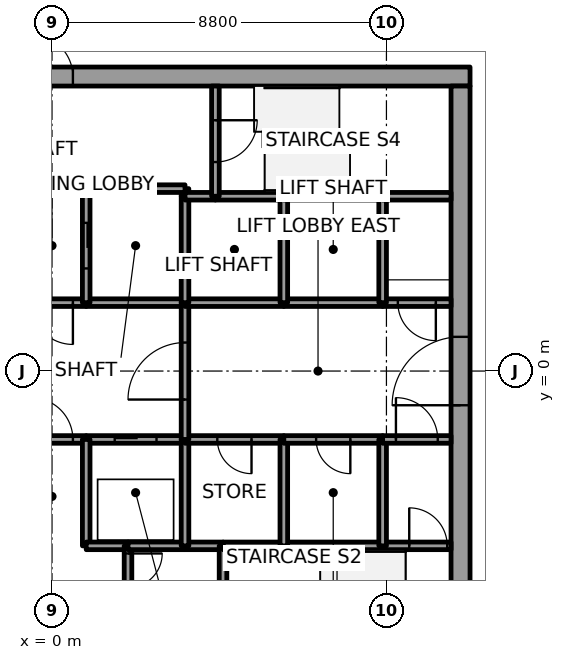
"""IFC4 building model, lengths in metres.
Left out: names, types, materials, properties, quantities, classifications, styles, units other than length and angle.
Written with IfcOpenShell. Run it as: python <this file> out.ifc"""

import sys

from ifc_helpers import new_model, si_unit, direction, frame, frame_2d, origin, place, context, subcontext, project, spatial, rectangle, extrude, element, fill, save


model = new_model("IFC4")
c1 = context("Model", 3, precision=1e-05, world=origin(), true_north=direction((0.0, 1.0)))
c2 = subcontext(c1, "Body", "Model", "MODEL_VIEW")
j1 = project(units=[si_unit("LENGTHUNIT", "METRE"), si_unit("PLANEANGLEUNIT", "RADIAN")], contexts=[c1])
p1 = place(None, origin())
s1 = spatial("IfcSite", under=j1, at=p1, CompositionType="ELEMENT")
p2 = place(p1, origin())
s2 = spatial("IfcBuilding", under=s1, at=p2, CompositionType="ELEMENT")
p3 = place(p2, frame((0.0, 0.0, 28.8)))
s3 = spatial("IfcBuildingStorey", under=s2, at=p3, CompositionType="ELEMENT", Elevation=28.8)
p4 = place(p3, frame((-11.0, 7.75, 0.0), z_axis=(0.0, 0.0, 1.0), x_axis=(1.0, 0.0, 0.0)))
e1 = element("IfcWall", 1, at=p4, inside=s3, PredefinedType="SHEAR", context=c2, shape_type="SweptSolid", body=[
    extrude(rectangle(XDim=22.0, YDim=0.5, at=frame_2d((11.0, 0.0))), origin(), (0.0, 0.0, 1.0), 5.4),
])
p5 = place(p4, frame((10.45, 0.0, 0.0)))
e2 = element("IfcOpeningElement", 2, at=p5, cuts=e1, PredefinedType="OPENING", context=c2, shape_type="SweptSolid", body=[
    extrude(rectangle(XDim=1.1, YDim=2.1, at=frame_2d((0.55, 1.05))), frame((0.0, 0.25, 0.0), z_axis=(0.0, -1.0, 0.0), x_axis=(1.0, 0.0, 0.0)), (0.0, 0.0, 1.0), 0.5),
])
p6 = place(p3, frame((10.75, -7.5, 0.0), z_axis=(0.0, 0.0, 1.0), x_axis=(0.0, 1.0, 0.0)))
e3 = element("IfcWall", 3, at=p6, inside=s3, PredefinedType="SHEAR", context=c2, shape_type="SweptSolid", body=[
    extrude(rectangle(XDim=15.0, YDim=0.5, at=frame_2d((7.5, 0.0))), origin(), (0.0, 0.0, 1.0), 5.4),
])
p7 = place(p6, frame((6.6, 0.0, 0.0)))
e4 = element("IfcOpeningElement", 4, at=p7, cuts=e3, PredefinedType="OPENING", context=c2, shape_type="SweptSolid", body=[
    extrude(rectangle(XDim=1.8, YDim=2.1, at=frame_2d((0.9, 1.05))), frame((0.0, 0.25, 0.0), z_axis=(0.0, -1.0, 0.0), x_axis=(1.0, 0.0, 0.0)), (0.0, 0.0, 1.0), 0.5),
])
p8 = place(p3, frame((-0.9, -1.8, 0.0), z_axis=(0.0, 0.0, 1.0), x_axis=(1.0, 0.0, 0.0)))
e5 = element("IfcWall", 5, at=p8, inside=s3, PredefinedType="SOLIDWALL", context=c2, shape_type="SweptSolid", body=[
    extrude(rectangle(XDim=1.8, YDim=0.2, at=frame_2d((0.9, 0.0))), origin(), (0.0, 0.0, 1.0), 5.0),
])
p9 = place(p8, frame((0.35, 0.0, 0.0)))
e6 = element("IfcOpeningElement", 6, at=p9, cuts=e5, PredefinedType="OPENING", context=c2, shape_type="SweptSolid", body=[
    extrude(rectangle(XDim=1.1, YDim=2.4, at=frame_2d((0.55, 1.2))), frame((0.0, 0.1, 0.0), z_axis=(0.0, -1.0, 0.0), x_axis=(1.0, 0.0, 0.0)), (0.0, 0.0, 1.0), 0.2),
])
p10 = place(p3, frame((0.9, 1.8, 0.0), z_axis=(0.0, 0.0, 1.0), x_axis=(-1.0, 0.0, 0.0)))
e7 = element("IfcWall", 7, at=p10, inside=s3, PredefinedType="SOLIDWALL", context=c2, shape_type="SweptSolid", body=[
    extrude(rectangle(XDim=1.8, YDim=0.2, at=frame_2d((0.9, 0.0))), origin(), (0.0, 0.0, 1.0), 5.0),
])
p11 = place(p10, frame((0.35, 0.0, 0.0)))
e8 = element("IfcOpeningElement", 8, at=p11, cuts=e7, PredefinedType="OPENING", context=c2, shape_type="SweptSolid", body=[
    extrude(rectangle(XDim=1.1, YDim=2.4, at=frame_2d((0.55, 1.2))), frame((0.0, 0.1, 0.0), z_axis=(0.0, -1.0, 0.0), x_axis=(1.0, 0.0, 0.0)), (0.0, 0.0, 1.0), 0.2),
])
p12 = place(p3, frame((0.9, -1.8, 0.0), z_axis=(0.0, 0.0, 1.0), x_axis=(1.0, 0.0, 0.0)))
e9 = element("IfcWall", 9, at=p12, inside=s3, PredefinedType="SOLIDWALL", context=c2, shape_type="SweptSolid", body=[
    extrude(rectangle(XDim=2.6, YDim=0.2, at=frame_2d((1.3, 0.0))), origin(), (0.0, 0.0, 1.0), 5.0),
])
p13 = place(p12, frame((0.75, 0.0, 0.0)))
e10 = element("IfcOpeningElement", 10, at=p13, cuts=e9, PredefinedType="OPENING", context=c2, shape_type="SweptSolid", body=[
    extrude(rectangle(XDim=1.1, YDim=2.1, at=frame_2d((0.55, 1.05))), frame((0.0, 0.1, 0.0), z_axis=(0.0, -1.0, 0.0), x_axis=(1.0, 0.0, 0.0)), (0.0, 0.0, 1.0), 0.2),
])
p14 = place(p3, frame((0.9, -1.8, 0.0), z_axis=(0.0, 0.0, 1.0), x_axis=(0.0, -1.0, 0.0)))
e11 = element("IfcWall", 11, at=p14, inside=s3, PredefinedType="SOLIDWALL", context=c2, shape_type="SweptSolid", body=[
    extrude(rectangle(XDim=2.8, YDim=0.2, at=frame_2d((1.4, 0.0))), origin(), (0.0, 0.0, 1.0), 5.0),
])
p15 = place(p3, frame((0.9, -4.6, 0.0), z_axis=(0.0, 0.0, 1.0), x_axis=(1.0, 0.0, 0.0)))
e12 = element("IfcWall", 12, at=p15, inside=s3, PredefinedType="SOLIDWALL", context=c2, shape_type="SweptSolid", body=[
    extrude(rectangle(XDim=1.1, YDim=0.2, at=frame_2d((0.55, 0.0))), origin(), (0.0, 0.0, 1.0), 5.0),
])
p16 = place(p3, frame((3.5, 1.8, 0.0), z_axis=(0.0, 0.0, 1.0), x_axis=(-1.0, 0.0, 0.0)))
e13 = element("IfcWall", 13, at=p16, inside=s3, PredefinedType="SOLIDWALL", context=c2, shape_type="SweptSolid", body=[
    extrude(rectangle(XDim=2.6, YDim=0.2, at=frame_2d((1.3, 0.0))), origin(), (0.0, 0.0, 1.0), 5.0),
])
p17 = place(p3, frame((3.5, 4.6, 0.0), z_axis=(0.0, 0.0, 1.0), x_axis=(0.0, 1.0, 0.0)))
e14 = element("IfcWall", 14, at=p17, inside=s3, PredefinedType="SOLIDWALL", context=c2, shape_type="SweptSolid", body=[
    extrude(rectangle(XDim=0.2, YDim=0.2, at=frame_2d((0.1, 0.0))), origin(), (0.0, 0.0, 1.0), 5.0),
])
p18 = place(p3, frame((3.5, 4.8, 0.0), z_axis=(0.0, 0.0, 1.0), x_axis=(-1.0, 0.0, 0.0)))
e15 = element("IfcWall", 15, at=p18, inside=s3, PredefinedType="SOLIDWALL", context=c2, shape_type="SweptSolid", body=[
    extrude(rectangle(XDim=2.6, YDim=0.2, at=frame_2d((1.3, 0.0))), origin(), (0.0, 0.0, 1.0), 5.0),
])
p19 = place(p3, frame((0.9, 4.8, 0.0), z_axis=(0.0, 0.0, 1.0), x_axis=(0.0, -1.0, 0.0)))
e16 = element("IfcWall", 16, at=p19, inside=s3, PredefinedType="SOLIDWALL", context=c2, shape_type="SweptSolid", body=[
    extrude(rectangle(XDim=3.0, YDim=0.2, at=frame_2d((1.5, 0.0))), origin(), (0.0, 0.0, 1.0), 5.0),
])
p20 = place(p19, frame((0.9, 0.0, 0.0)))
e17 = element("IfcOpeningElement", 17, at=p20, cuts=e16, PredefinedType="OPENING", context=c2, shape_type="SweptSolid", body=[
    extrude(rectangle(XDim=1.2, YDim=2.1, at=frame_2d((0.6, 1.05))), frame((0.0, 0.1, 0.0), z_axis=(0.0, -1.0, 0.0), x_axis=(1.0, 0.0, 0.0)), (0.0, 0.0, 1.0), 0.2),
])
p21 = place(p3, frame((2.0, -4.6, 0.0), z_axis=(0.0, 0.0, 1.0), x_axis=(0.0, -1.0, 0.0)))
e18 = element("IfcWall", 18, at=p21, inside=s3, PredefinedType="SOLIDWALL", context=c2, shape_type="SweptSolid", body=[
    extrude(rectangle(XDim=1.3, YDim=0.2, at=frame_2d((0.65, 0.0))), origin(), (0.0, 0.0, 1.0), 5.0),
])
p22 = place(p21, frame((0.2, 0.0, 0.0)))
e19 = element("IfcOpeningElement", 19, at=p22, cuts=e18, PredefinedType="OPENING", context=c2, shape_type="SweptSolid", body=[
    extrude(rectangle(XDim=0.9, YDim=2.4, at=frame_2d((0.45, 1.2))), frame((0.0, 0.1, 0.0), z_axis=(0.0, -1.0, 0.0), x_axis=(1.0, 0.0, 0.0)), (0.0, 0.0, 1.0), 0.2),
])
p23 = place(p3, frame((3.5, -4.6, 0.0), z_axis=(0.0, 0.0, 1.0), x_axis=(-1.0, 0.0, 0.0)))
e20 = element("IfcWall", 20, at=p23, inside=s3, PredefinedType="SOLIDWALL", context=c2, shape_type="SweptSolid", body=[
    extrude(rectangle(XDim=1.5, YDim=0.2, at=frame_2d((0.75, 0.0))), origin(), (0.0, 0.0, 1.0), 5.0),
])
p24 = place(p3, frame((3.5, -4.6, 0.0), z_axis=(0.0, 0.0, 1.0), x_axis=(1.0, 0.0, 0.0)))
e21 = element("IfcWall", 21, at=p24, inside=s3, PredefinedType="SOLIDWALL", context=c2, shape_type="SweptSolid", body=[
    extrude(rectangle(XDim=1.0, YDim=0.2, at=frame_2d((0.5, 0.0))), origin(), (0.0, 0.0, 1.0), 5.0),
])
p25 = place(p3, frame((3.5, -1.8, 0.0), z_axis=(0.0, 0.0, 1.0), x_axis=(0.0, -1.0, 0.0)))
e22 = element("IfcWall", 22, at=p25, inside=s3, PredefinedType="SOLIDWALL", context=c2, shape_type="SweptSolid", body=[
    extrude(rectangle(XDim=2.8, YDim=0.2, at=frame_2d((1.4, 0.0))), origin(), (0.0, 0.0, 1.0), 5.0),
])
p26 = place(p3, frame((6.1, -1.8, 0.0), z_axis=(0.0, 0.0, 1.0), x_axis=(-1.0, 0.0, 0.0)))
e23 = element("IfcWall", 23, at=p26, inside=s3, PredefinedType="SOLIDWALL", context=c2, shape_type="SweptSolid", body=[
    extrude(rectangle(XDim=2.6, YDim=0.2, at=frame_2d((1.3, 0.0))), origin(), (0.0, 0.0, 1.0), 5.0),
])
p27 = place(p26, frame((0.85, 0.0, 0.0)))
e24 = element("IfcOpeningElement", 24, at=p27, cuts=e23, PredefinedType="OPENING", context=c2, shape_type="SweptSolid", body=[
    extrude(rectangle(XDim=0.9, YDim=2.4, at=frame_2d((0.45, 1.2))), frame((0.0, 0.1, 0.0), z_axis=(0.0, -1.0, 0.0), x_axis=(1.0, 0.0, 0.0)), (0.0, 0.0, 1.0), 0.2),
])
p28 = place(p3, frame((3.5, -1.8, 0.0), z_axis=(0.0, 0.0, 1.0), x_axis=(0.0, 1.0, 0.0)))
e25 = element("IfcWall", 25, at=p28, inside=s3, PredefinedType="SOLIDWALL", context=c2, shape_type="SweptSolid", body=[
    extrude(rectangle(XDim=3.6, YDim=0.2, at=frame_2d((1.8, 0.0))), origin(), (0.0, 0.0, 1.0), 5.0),
])
p29 = place(p28, frame((1.05, 0.0, 0.0)))
e26 = element("IfcOpeningElement", 26, at=p29, cuts=e25, PredefinedType="OPENING", context=c2, shape_type="SweptSolid", body=[
    extrude(rectangle(XDim=1.5, YDim=2.4, at=frame_2d((0.75, 1.2))), frame((0.0, 0.1, 0.0), z_axis=(0.0, -1.0, 0.0), x_axis=(1.0, 0.0, 0.0)), (0.0, 0.0, 1.0), 0.2),
])
p30 = place(p3, frame((6.1, 1.8, 0.0), z_axis=(0.0, 0.0, 1.0), x_axis=(-1.0, 0.0, 0.0)))
e27 = element("IfcWall", 27, at=p30, inside=s3, PredefinedType="SOLIDWALL", context=c2, shape_type="SweptSolid", body=[
    extrude(rectangle(XDim=2.6, YDim=0.2, at=frame_2d((1.3, 0.0))), origin(), (0.0, 0.0, 1.0), 5.0),
])
p31 = place(p3, frame((3.5, 1.8, 0.0), z_axis=(0.0, 0.0, 1.0), x_axis=(0.0, 1.0, 0.0)))
e28 = element("IfcWall", 28, at=p31, inside=s3, PredefinedType="SOLIDWALL", context=c2, shape_type="SweptSolid", body=[
    extrude(rectangle(XDim=2.8, YDim=0.2, at=frame_2d((1.4, 0.0))), origin(), (0.0, 0.0, 1.0), 5.0),
])
p32 = place(p3, frame((4.3, 4.6, 0.0), z_axis=(0.0, 0.0, 1.0), x_axis=(-1.0, 0.0, 0.0)))
e29 = element("IfcWall", 29, at=p32, inside=s3, PredefinedType="SOLIDWALL", context=c2, shape_type="SweptSolid", body=[
    extrude(rectangle(XDim=0.8, YDim=0.2, at=frame_2d((0.4, 0.0))), origin(), (0.0, 0.0, 1.0), 5.0),
])
p33 = place(p3, frame((6.1, 4.6, 0.0), z_axis=(0.0, 0.0, 1.0), x_axis=(-1.0, 0.0, 0.0)))
e30 = element("IfcWall", 30, at=p33, inside=s3, PredefinedType="SOLIDWALL", context=c2, shape_type="SweptSolid", body=[
    extrude(rectangle(XDim=1.8, YDim=0.2, at=frame_2d((0.9, 0.0))), origin(), (0.0, 0.0, 1.0), 5.0),
])
p34 = place(p3, frame((4.3, 7.5, 0.0), z_axis=(0.0, 0.0, 1.0), x_axis=(0.0, -1.0, 0.0)))
e31 = element("IfcWall", 31, at=p34, inside=s3, PredefinedType="SOLIDWALL", context=c2, shape_type="SweptSolid", body=[
    extrude(rectangle(XDim=2.9, YDim=0.2, at=frame_2d((1.45, 0.0))), origin(), (0.0, 0.0, 1.0), 5.0),
])
p35 = place(p34, frame((0.9, 0.0, 0.0)))
e32 = element("IfcOpeningElement", 32, at=p35, cuts=e31, PredefinedType="OPENING", context=c2, shape_type="SweptSolid", body=[
    extrude(rectangle(XDim=1.1, YDim=2.4, at=frame_2d((0.55, 1.2))), frame((0.0, 0.1, 0.0), z_axis=(0.0, -1.0, 0.0), x_axis=(1.0, 0.0, 0.0)), (0.0, 0.0, 1.0), 0.2),
])
p36 = place(p3, frame((4.5, -5.9, 0.0), z_axis=(0.0, 0.0, 1.0), x_axis=(0.0, 1.0, 0.0)))
e33 = element("IfcWall", 33, at=p36, inside=s3, PredefinedType="SOLIDWALL", context=c2, shape_type="SweptSolid", body=[
    extrude(rectangle(XDim=1.3, YDim=0.2, at=frame_2d((0.65, 0.0))), origin(), (0.0, 0.0, 1.0), 5.0),
])
p37 = place(p3, frame((4.5, -4.6, 0.0), z_axis=(0.0, 0.0, 1.0), x_axis=(1.0, 0.0, 0.0)))
e34 = element("IfcWall", 34, at=p37, inside=s3, PredefinedType="SOLIDWALL", context=c2, shape_type="SweptSolid", body=[
    extrude(rectangle(XDim=1.6, YDim=0.2, at=frame_2d((0.8, 0.0))), origin(), (0.0, 0.0, 1.0), 5.0),
])
p38 = place(p3, frame((6.1, -4.6, 0.0), z_axis=(0.0, 0.0, 1.0), x_axis=(1.0, 0.0, 0.0)))
e35 = element("IfcWall", 35, at=p38, inside=s3, PredefinedType="SOLIDWALL", context=c2, shape_type="SweptSolid", body=[
    extrude(rectangle(XDim=2.6, YDim=0.2, at=frame_2d((1.3, 0.0))), origin(), (0.0, 0.0, 1.0), 5.0),
])
p39 = place(p3, frame((6.1, -4.6, 0.0), z_axis=(0.0, 0.0, 1.0), x_axis=(0.0, 1.0, 0.0)))
e36 = element("IfcWall", 36, at=p39, inside=s3, PredefinedType="SOLIDWALL", context=c2, shape_type="SweptSolid", body=[
    extrude(rectangle(XDim=2.8, YDim=0.2, at=frame_2d((1.4, 0.0))), origin(), (0.0, 0.0, 1.0), 5.0),
])
p40 = place(p3, frame((8.7, -1.8, 0.0), z_axis=(0.0, 0.0, 1.0), x_axis=(-1.0, 0.0, 0.0)))
e37 = element("IfcWall", 37, at=p40, inside=s3, PredefinedType="SOLIDWALL", context=c2, shape_type="SweptSolid", body=[
    extrude(rectangle(XDim=2.6, YDim=0.2, at=frame_2d((1.3, 0.0))), origin(), (0.0, 0.0, 1.0), 5.0),
])
p41 = place(p40, frame((0.85, 0.0, 0.0)))
e38 = element("IfcOpeningElement", 38, at=p41, cuts=e37, PredefinedType="OPENING", context=c2, shape_type="SweptSolid", body=[
    extrude(rectangle(XDim=0.9, YDim=2.4, at=frame_2d((0.45, 1.2))), frame((0.0, 0.1, 0.0), z_axis=(0.0, -1.0, 0.0), x_axis=(1.0, 0.0, 0.0)), (0.0, 0.0, 1.0), 0.2),
])
p42 = place(p3, frame((8.7, 1.8, 0.0), z_axis=(0.0, 0.0, 1.0), x_axis=(-1.0, 0.0, 0.0)))
e39 = element("IfcWall", 39, at=p42, inside=s3, PredefinedType="SOLIDWALL", context=c2, shape_type="SweptSolid", body=[
    extrude(rectangle(XDim=2.6, YDim=0.2, at=frame_2d((1.3, 0.0))), origin(), (0.0, 0.0, 1.0), 5.0),
])
p43 = place(p3, frame((6.1, 1.8, 0.0), z_axis=(0.0, 0.0, 1.0), x_axis=(0.0, 1.0, 0.0)))
e40 = element("IfcWall", 40, at=p43, inside=s3, PredefinedType="SOLIDWALL", context=c2, shape_type="SweptSolid", body=[
    extrude(rectangle(XDim=2.8, YDim=0.2, at=frame_2d((1.4, 0.0))), origin(), (0.0, 0.0, 1.0), 5.0),
])
p44 = place(p3, frame((8.7, 4.6, 0.0), z_axis=(0.0, 0.0, 1.0), x_axis=(-1.0, 0.0, 0.0)))
e41 = element("IfcWall", 41, at=p44, inside=s3, PredefinedType="SOLIDWALL", context=c2, shape_type="SweptSolid", body=[
    extrude(rectangle(XDim=2.6, YDim=0.2, at=frame_2d((1.3, 0.0))), origin(), (0.0, 0.0, 1.0), 5.0),
])
p45 = place(p3, frame((8.7, -4.6, 0.0), z_axis=(0.0, 0.0, 1.0), x_axis=(1.0, 0.0, 0.0)))
e42 = element("IfcWall", 42, at=p45, inside=s3, PredefinedType="SOLIDWALL", context=c2, shape_type="SweptSolid", body=[
    extrude(rectangle(XDim=1.8, YDim=0.2, at=frame_2d((0.9, 0.0))), origin(), (0.0, 0.0, 1.0), 5.0),
])
p46 = place(p45, frame((0.7, 0.0, 0.0)))
e43 = element("IfcOpeningElement", 43, at=p46, cuts=e42, PredefinedType="OPENING", context=c2, shape_type="SweptSolid", body=[
    extrude(rectangle(XDim=1.0, YDim=2.1, at=frame_2d((0.5, 1.05))), frame((0.0, 0.1, 0.0), z_axis=(0.0, -1.0, 0.0), x_axis=(1.0, 0.0, 0.0)), (0.0, 0.0, 1.0), 0.2),
])
p47 = place(p3, frame((8.7, -4.6, 0.0), z_axis=(0.0, 0.0, 1.0), x_axis=(0.0, 1.0, 0.0)))
e44 = element("IfcWall", 44, at=p47, inside=s3, PredefinedType="SOLIDWALL", context=c2, shape_type="SweptSolid", body=[
    extrude(rectangle(XDim=2.8, YDim=0.2, at=frame_2d((1.4, 0.0))), origin(), (0.0, 0.0, 1.0), 5.0),
])
p48 = place(p3, frame((8.7, -1.8, 0.0), z_axis=(0.0, 0.0, 1.0), x_axis=(1.0, 0.0, 0.0)))
e45 = element("IfcWall", 45, at=p48, inside=s3, PredefinedType="SOLIDWALL", context=c2, shape_type="SweptSolid", body=[
    extrude(rectangle(XDim=1.8, YDim=0.2, at=frame_2d((0.9, 0.0))), origin(), (0.0, 0.0, 1.0), 5.0),
])
p49 = place(p48, frame((0.35, 0.0, 0.0)))
e46 = element("IfcOpeningElement", 46, at=p49, cuts=e45, PredefinedType="OPENING", context=c2, shape_type="SweptSolid", body=[
    extrude(rectangle(XDim=1.1, YDim=2.4, at=frame_2d((0.55, 1.2))), frame((0.0, 0.1, 0.0), z_axis=(0.0, -1.0, 0.0), x_axis=(1.0, 0.0, 0.0)), (0.0, 0.0, 1.0), 0.2),
])
p50 = place(p3, frame((10.5, 1.8, 0.0), z_axis=(0.0, 0.0, 1.0), x_axis=(-1.0, 0.0, 0.0)))
e47 = element("IfcWall", 47, at=p50, inside=s3, PredefinedType="SOLIDWALL", context=c2, shape_type="SweptSolid", body=[
    extrude(rectangle(XDim=1.8, YDim=0.2, at=frame_2d((0.9, 0.0))), origin(), (0.0, 0.0, 1.0), 5.0),
])
p51 = place(p50, frame((0.4, 0.0, 0.0)))
e48 = element("IfcOpeningElement", 48, at=p51, cuts=e47, PredefinedType="OPENING", context=c2, shape_type="SweptSolid", body=[
    extrude(rectangle(XDim=1.0, YDim=2.4, at=frame_2d((0.5, 1.2))), frame((0.0, 0.1, 0.0), z_axis=(0.0, -1.0, 0.0), x_axis=(1.0, 0.0, 0.0)), (0.0, 0.0, 1.0), 0.2),
])
p52 = place(p3, frame((8.7, 4.6, 0.0), z_axis=(0.0, 0.0, 1.0), x_axis=(0.0, -1.0, 0.0)))
e49 = element("IfcWall", 49, at=p52, inside=s3, PredefinedType="SOLIDWALL", context=c2, shape_type="SweptSolid", body=[
    extrude(rectangle(XDim=2.8, YDim=0.2, at=frame_2d((1.4, 0.0))), origin(), (0.0, 0.0, 1.0), 5.0),
])
p53 = place(p3, frame((10.5, 4.6, 0.0), z_axis=(0.0, 0.0, 1.0), x_axis=(-1.0, 0.0, 0.0)))
e50 = element("IfcWall", 50, at=p53, inside=s3, PredefinedType="SOLIDWALL", context=c2, shape_type="SweptSolid", body=[
    extrude(rectangle(XDim=1.8, YDim=0.2, at=frame_2d((0.9, 0.0))), origin(), (0.0, 0.0, 1.0), 5.0),
])
p54 = place(p13, origin())
e51 = element("IfcDoor", 51, at=p54, inside=s3, OperationType="SLIDING_TO_LEFT", PredefinedType="DOOR", context=c2, shape_type="SweptSolid", body=[
    extrude(rectangle(XDim=1.1, YDim=2.1, at=frame_2d((0.55, 1.05))), frame((0.0, 0.025, 0.0), z_axis=(0.0, -1.0, 0.0), x_axis=(1.0, 0.0, 0.0)), (0.0, 0.0, 1.0), 0.05),
])
fill(e10, e51)
p55 = place(p20, origin())
e52 = element("IfcDoor", 52, at=p55, inside=s3, OperationType="SLIDING_TO_RIGHT", PredefinedType="DOOR", context=c2, shape_type="SweptSolid", body=[
    extrude(rectangle(XDim=1.2, YDim=2.1, at=frame_2d((0.6, 1.05))), frame((0.0, 0.025, 0.0), z_axis=(0.0, -1.0, 0.0), x_axis=(1.0, 0.0, 0.0)), (0.0, 0.0, 1.0), 0.05),
])
fill(e17, e52)
p56 = place(p29, origin())
e53 = element("IfcDoor", 53, at=p56, inside=s3, OperationType="DOUBLE_DOOR_SINGLE_SWING", PredefinedType="DOOR", context=c2, shape_type="SweptSolid", body=[
    extrude(rectangle(XDim=1.5, YDim=2.4, at=frame_2d((0.75, 1.2))), frame((0.0, 0.025, 0.0), z_axis=(0.0, -1.0, 0.0), x_axis=(1.0, 0.0, 0.0)), (0.0, 0.0, 1.0), 0.05),
])
fill(e26, e53)
p57 = place(p49, origin())
e54 = element("IfcDoor", 54, at=p57, inside=s3, OperationType="SINGLE_SWING_RIGHT", PredefinedType="DOOR", context=c2, shape_type="SweptSolid", body=[
    extrude(rectangle(XDim=1.1, YDim=2.4, at=frame_2d((0.55, 1.2))), frame((0.0, 0.025, 0.0), z_axis=(0.0, -1.0, 0.0), x_axis=(1.0, 0.0, 0.0)), (0.0, 0.0, 1.0), 0.05),
])
fill(e46, e54)
p58 = place(p11, origin())
e55 = element("IfcDoor", 55, at=p58, inside=s3, OperationType="SINGLE_SWING_LEFT", PredefinedType="DOOR", context=c2, shape_type="SweptSolid", body=[
    extrude(rectangle(XDim=1.1, YDim=2.4, at=frame_2d((0.55, 1.2))), frame((0.0, 0.025, 0.0), z_axis=(0.0, -1.0, 0.0), x_axis=(1.0, 0.0, 0.0)), (0.0, 0.0, 1.0), 0.05),
])
fill(e8, e55)
p59 = place(p9, origin())
e56 = element("IfcDoor", 56, at=p59, inside=s3, OperationType="SINGLE_SWING_RIGHT", PredefinedType="DOOR", context=c2, shape_type="SweptSolid", body=[
    extrude(rectangle(XDim=1.1, YDim=2.4, at=frame_2d((0.55, 1.2))), frame((0.0, 0.025, 0.0), z_axis=(0.0, -1.0, 0.0), x_axis=(1.0, 0.0, 0.0)), (0.0, 0.0, 1.0), 0.05),
])
fill(e6, e56)
p60 = place(p51, origin())
e57 = element("IfcDoor", 57, at=p60, inside=s3, OperationType="SINGLE_SWING_RIGHT", PredefinedType="DOOR", context=c2, shape_type="SweptSolid", body=[
    extrude(rectangle(XDim=1.0, YDim=2.4, at=frame_2d((0.5, 1.2))), frame((0.0, 0.025, 0.0), z_axis=(0.0, -1.0, 0.0), x_axis=(1.0, 0.0, 0.0)), (0.0, 0.0, 1.0), 0.05),
])
fill(e48, e57)
p61 = place(p46, origin())
e58 = element("IfcDoor", 58, at=p61, inside=s3, OperationType="SINGLE_SWING_RIGHT", PredefinedType="DOOR", context=c2, shape_type="SweptSolid", body=[
    extrude(rectangle(XDim=1.0, YDim=2.1, at=frame_2d((0.5, 1.05))), frame((0.0, 0.025, 0.0), z_axis=(0.0, -1.0, 0.0), x_axis=(1.0, 0.0, 0.0)), (0.0, 0.0, 1.0), 0.05),
])
fill(e43, e58)
p62 = place(p35, origin())
e59 = element("IfcDoor", 59, at=p62, inside=s3, OperationType="SINGLE_SWING_RIGHT", PredefinedType="DOOR", context=c2, shape_type="SweptSolid", body=[
    extrude(rectangle(XDim=1.1, YDim=2.4, at=frame_2d((0.55, 1.2))), frame((0.0, 0.025, 0.0), z_axis=(0.0, -1.0, 0.0), x_axis=(1.0, 0.0, 0.0)), (0.0, 0.0, 1.0), 0.05),
])
fill(e32, e59)
p63 = place(p27, origin())
e60 = element("IfcDoor", 60, at=p63, inside=s3, OperationType="SINGLE_SWING_RIGHT", PredefinedType="DOOR", context=c2, shape_type="SweptSolid", body=[
    extrude(rectangle(XDim=0.9, YDim=2.4, at=frame_2d((0.45, 1.2))), frame((0.0, 0.025, 0.0), z_axis=(0.0, -1.0, 0.0), x_axis=(1.0, 0.0, 0.0)), (0.0, 0.0, 1.0), 0.05),
])
fill(e24, e60)
p64 = place(p41, origin())
e61 = element("IfcDoor", 61, at=p64, inside=s3, OperationType="SINGLE_SWING_LEFT", PredefinedType="DOOR", context=c2, shape_type="SweptSolid", body=[
    extrude(rectangle(XDim=0.9, YDim=2.4, at=frame_2d((0.45, 1.2))), frame((0.0, 0.025, 0.0), z_axis=(0.0, -1.0, 0.0), x_axis=(1.0, 0.0, 0.0)), (0.0, 0.0, 1.0), 0.05),
])
fill(e38, e61)
p65 = place(p22, origin())
e62 = element("IfcDoor", 62, at=p65, inside=s3, OperationType="SINGLE_SWING_RIGHT", PredefinedType="DOOR", context=c2, shape_type="SweptSolid", body=[
    extrude(rectangle(XDim=0.9, YDim=2.4, at=frame_2d((0.45, 1.2))), frame((0.0, 0.025, 0.0), z_axis=(0.0, -1.0, 0.0), x_axis=(1.0, 0.0, 0.0)), (0.0, 0.0, 1.0), 0.05),
])
fill(e19, e62)
p66 = place(p7, origin())
e63 = element("IfcDoor", 63, at=p66, inside=s3, OperationType="DOUBLE_DOOR_SINGLE_SWING", PredefinedType="DOOR", context=c2, shape_type="SweptSolid", body=[
    extrude(rectangle(XDim=1.8, YDim=2.1, at=frame_2d((0.9, 1.05))), frame((0.0, 0.025, 0.0), z_axis=(0.0, -1.0, 0.0), x_axis=(1.0, 0.0, 0.0)), (0.0, 0.0, 1.0), 0.05),
])
fill(e4, e63)
p67 = place(p5, origin())
e64 = element("IfcDoor", 64, at=p67, inside=s3, OperationType="SINGLE_SWING_RIGHT", PredefinedType="DOOR", context=c2, shape_type="SweptSolid", body=[
    extrude(rectangle(XDim=1.1, YDim=2.1, at=frame_2d((0.55, 1.05))), frame((0.0, 0.025, 0.0), z_axis=(0.0, -1.0, 0.0), x_axis=(1.0, 0.0, 0.0)), (0.0, 0.0, 1.0), 0.05),
])
fill(e2, e64)
save(model, sys.argv[1])
